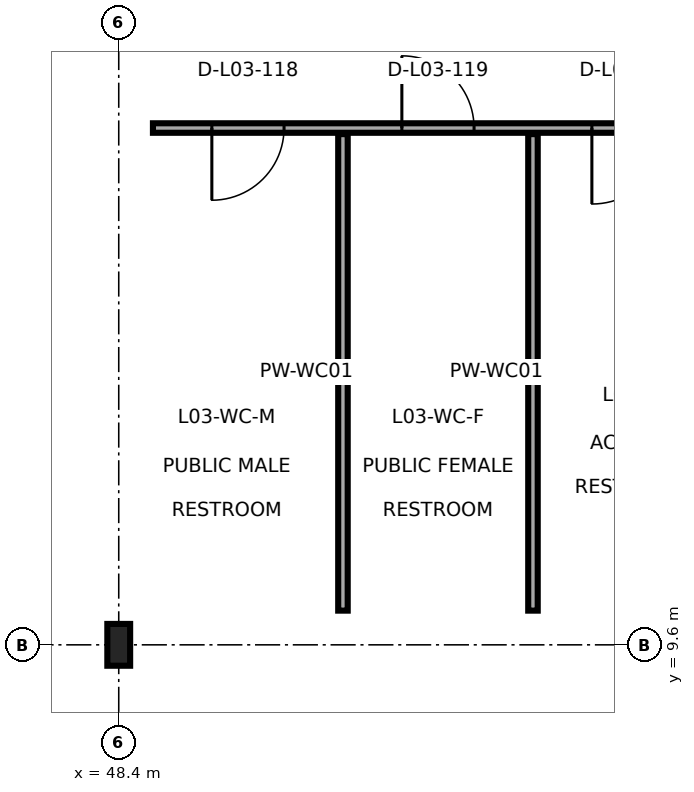
"""IFC4 building model, lengths in metres.
Left out: names, types, materials, properties, quantities, classifications, styles, units other than length and angle.
Written with IfcOpenShell. Run it as: python <this file> out.ifc"""

import sys

from ifc_helpers import new_model, si_unit, direction, frame, frame_2d, origin, origin_2d, place, context, subcontext, project, spatial, rectangle, i_section, extrude, element, fill, save


model = new_model("IFC4")
c1 = context("Model", 3, precision=1e-05, world=origin(), true_north=direction((0.0, 1.0)))
c2 = subcontext(c1, "Body", "Model", "MODEL_VIEW")
j1 = project(units=[si_unit("LENGTHUNIT", "METRE"), si_unit("PLANEANGLEUNIT", "RADIAN")], contexts=[c1])
p1 = place(None, origin())
s1 = spatial("IfcSite", under=j1, at=p1, CompositionType="ELEMENT")
p2 = place(p1, origin())
s2 = spatial("IfcBuilding", under=s1, at=p2, CompositionType="ELEMENT")
p3 = place(p2, frame((0.0, 0.0, 17.4)))
s3 = spatial("IfcBuildingStorey", under=s2, at=p3, CompositionType="ELEMENT", Elevation=17.4)
p4 = place(p3, frame((48.4, 9.6, 0.0), z_axis=(0.0, 0.0, 1.0), x_axis=(1.0, 0.0, 0.0)))
e1 = element("IfcColumn", 1, at=p4, inside=s3, PredefinedType="COLUMN", context=c2, shape_type="SweptSolid", body=[
    extrude(i_section(OverallWidth=0.3, OverallDepth=0.55, WebThickness=0.015, FlangeThickness=0.029, FilletRadius=0.027, at=origin_2d()), origin(), (0.0, 0.0, 1.0), 4.5),
])
p5 = place(p3, frame((48.85, 16.4, 0.0), z_axis=(0.0, 0.0, 1.0), x_axis=(1.0, 0.0, 0.0)))
e2 = element("IfcWall", 2, at=p5, inside=s3, PredefinedType="PARTITIONING", context=c2, shape_type="SweptSolid", body=[
    extrude(rectangle(XDim=7.5, YDim=0.125, at=frame_2d((3.75, 0.0))), origin(), (0.0, 0.0, 1.0), 3.902),
])
p6 = place(p5, frame((0.775, 0.0, 0.0)))
e3 = element("IfcOpeningElement", 3, at=p6, cuts=e2, PredefinedType="OPENING", context=c2, shape_type="SweptSolid", body=[
    extrude(rectangle(XDim=0.95, YDim=2.1, at=frame_2d((0.475, 1.05))), frame((0.0, 0.073, 0.0), z_axis=(0.0, -1.0, 0.0), x_axis=(1.0, 0.0, 0.0)), (0.0, 0.0, 1.0), 0.145),
])
p7 = place(p5, frame((3.275, 0.0, 0.0)))
e4 = element("IfcOpeningElement", 4, at=p7, cuts=e2, PredefinedType="OPENING", context=c2, shape_type="SweptSolid", body=[
    extrude(rectangle(XDim=0.95, YDim=2.1, at=frame_2d((0.475, 1.05))), frame((0.0, 0.073, 0.0), z_axis=(0.0, -1.0, 0.0), x_axis=(1.0, 0.0, 0.0)), (0.0, 0.0, 1.0), 0.145),
])
p8 = place(p5, frame((5.775, 0.0, 0.0)))
e5 = element("IfcOpeningElement", 5, at=p8, cuts=e2, PredefinedType="OPENING", context=c2, shape_type="SweptSolid", body=[
    extrude(rectangle(XDim=1.0, YDim=2.12, at=frame_2d((0.5, 1.06))), frame((0.0, 0.073, 0.0), z_axis=(0.0, -1.0, 0.0), x_axis=(1.0, 0.0, 0.0)), (0.0, 0.0, 1.0), 0.145),
])
for number, where, z_axis, x_axis in (
    (6, (51.35, 10.05, 0.0), (0.0, 0.0, 1.0), (0.0, 1.0, 0.0)),
    (7, (53.85, 10.05, 0.0), (0.0, 0.0, 1.0), (0.0, 1.0, 0.0)),
):
    element("IfcWall", number, at=place(p3, frame(where, z_axis=z_axis, x_axis=x_axis)), inside=s3, PredefinedType="PARTITIONING", context=c2, shape_type="SweptSolid", body=[
        extrude(rectangle(XDim=6.27, YDim=0.125, at=frame_2d((3.135, 0.0))), origin(), (0.0, 0.0, 1.0), 4.23),
    ])
p9 = place(p6, frame((0.95, 0.0, 0.0), z_axis=(0.0, 0.0, 1.0), x_axis=(-1.0, 0.0, 0.0)))
e8 = element("IfcDoor", 8, at=p9, inside=s3, OperationType="SINGLE_SWING_RIGHT", PredefinedType="DOOR", context=c2, shape_type="SweptSolid", body=[
    extrude(rectangle(XDim=0.95, YDim=2.1, at=frame_2d((0.475, 1.05))), frame((0.0, 0.025, 0.0), z_axis=(0.0, -1.0, 0.0), x_axis=(1.0, 0.0, 0.0)), (0.0, 0.0, 1.0), 0.05),
])
fill(e3, e8)
p10 = place(p7, frame((0.95, 0.0, 0.0), z_axis=(0.0, 0.0, 1.0), x_axis=(-1.0, 0.0, 0.0)))
e9 = element("IfcDoor", 9, at=p10, inside=s3, OperationType="SINGLE_SWING_LEFT", PredefinedType="DOOR", context=c2, shape_type="SweptSolid", body=[
    extrude(rectangle(XDim=0.95, YDim=2.1, at=frame_2d((0.475, 1.05))), frame((0.0, 0.025, 0.0), z_axis=(0.0, -1.0, 0.0), x_axis=(1.0, 0.0, 0.0)), (0.0, 0.0, 1.0), 0.05),
])
fill(e4, e9)
p11 = place(p8, frame((1.0, 0.0, 0.0), z_axis=(0.0, 0.0, 1.0), x_axis=(-1.0, 0.0, 0.0)))
e10 = element("IfcDoor", 10, at=p11, inside=s3, OperationType="SINGLE_SWING_RIGHT", PredefinedType="DOOR", context=c2, shape_type="SweptSolid", body=[
    extrude(rectangle(XDim=1.0, YDim=2.12, at=frame_2d((0.5, 1.06))), frame((0.0, 0.025, 0.0), z_axis=(0.0, -1.0, 0.0), x_axis=(1.0, 0.0, 0.0)), (0.0, 0.0, 1.0), 0.05),
])
fill(e5, e10)
save(model, sys.argv[1])
